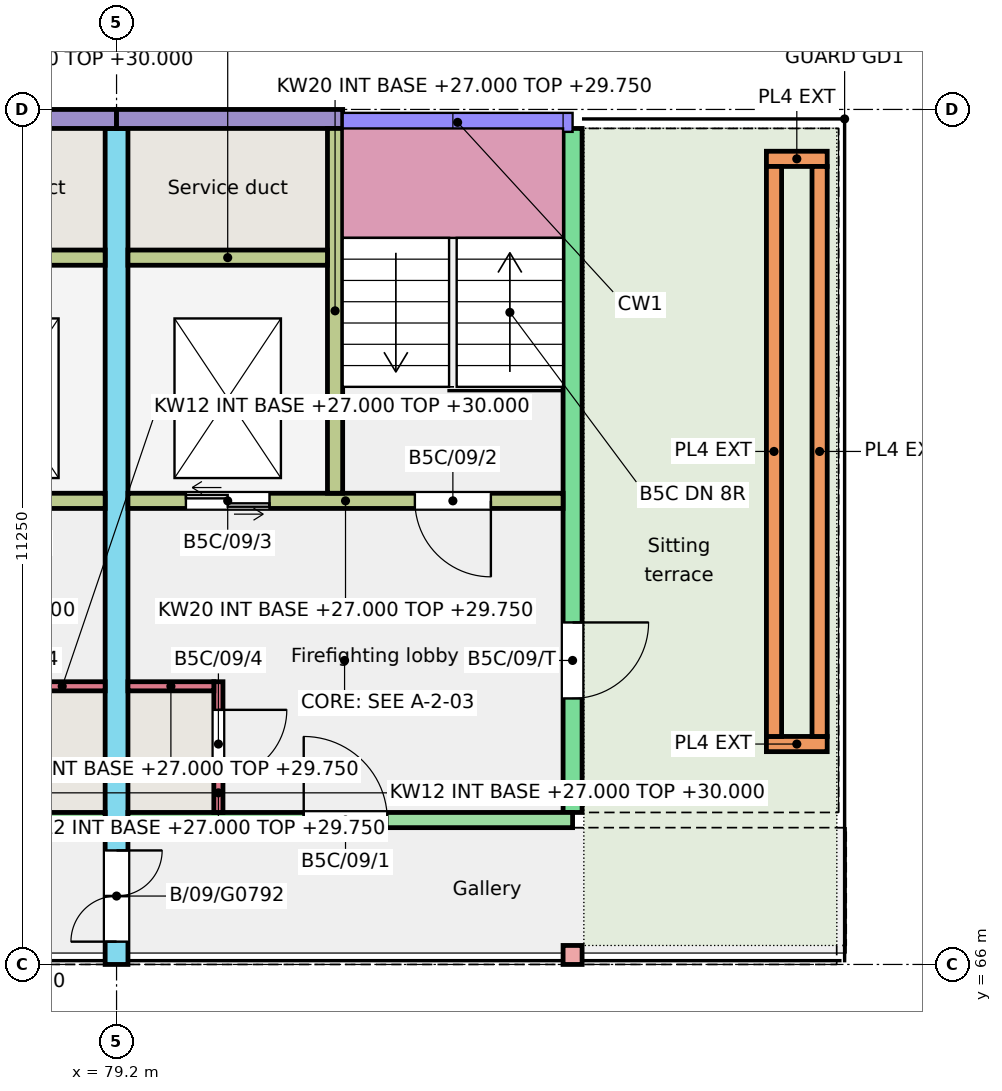
"""IFC4 building model, lengths in metres.
Left out: names, types, materials, properties, quantities, classifications, styles, units other than length and angle.
Written with IfcOpenShell. Run it as: python <this file> out.ifc"""

import sys

from ifc_helpers import new_model, si_unit, direction, frame, frame_2d, origin, origin_2d, place, context, subcontext, project, spatial, rectangle, extrude, element, fill, save


model = new_model("IFC4")
c1 = context("Model", 3, precision=1e-05, world=origin(), true_north=direction((0.0, 1.0)))
c2 = subcontext(c1, "Body", "Model", "MODEL_VIEW")
j1 = project(units=[si_unit("LENGTHUNIT", "METRE"), si_unit("PLANEANGLEUNIT", "RADIAN")], contexts=[c1])
p1 = place(None, origin())
s1 = spatial("IfcSite", under=j1, at=p1, CompositionType="ELEMENT")
p2 = place(p1, origin())
s2 = spatial("IfcBuilding", under=s1, at=p2, CompositionType="ELEMENT")
p3 = place(p2, frame((0.0, 0.0, 27.0)))
s3 = spatial("IfcBuildingStorey", under=s2, at=p3, CompositionType="ELEMENT", Elevation=27.0)
p4 = place(p3, frame((79.2, 66.0, 0.0), z_axis=(0.0, 0.0, 1.0), x_axis=(0.0, 1.0, 0.0)))
e1 = element("IfcWall", 1, at=p4, inside=s3, PredefinedType="SHEAR", context=c2, shape_type="SweptSolid", body=[
    extrude(rectangle(XDim=11.0, YDim=0.3, at=frame_2d((5.5, 0.0))), origin(), (0.0, 0.0, 1.0), 3.0),
])
p5 = place(p4, frame((0.3, 0.0, 0.0)))
e2 = element("IfcOpeningElement", 2, at=p5, cuts=e1, PredefinedType="OPENING", context=c2, shape_type="SweptSolid", body=[
    extrude(rectangle(XDim=1.2, YDim=2.1, at=frame_2d((0.6, 1.05))), frame((0.0, 0.16, 0.0), z_axis=(0.0, -1.0, 0.0), x_axis=(1.0, 0.0, 0.0)), (0.0, 0.0, 1.0), 0.32),
])
p6 = place(p3, frame((85.2, 68.0, 0.0), z_axis=(0.0, 0.0, 1.0), x_axis=(0.0, 1.0, 0.0)))
e3 = element("IfcWall", 3, at=p6, inside=s3, PredefinedType="SHEAR", context=c2, shape_type="SweptSolid", body=[
    extrude(rectangle(XDim=9.0, YDim=0.25, at=frame_2d((4.5, 0.0))), origin(), (0.0, 0.0, 1.0), 3.0),
])
p7 = place(p6, frame((1.5, 0.0, 0.0)))
e4 = element("IfcOpeningElement", 4, at=p7, cuts=e3, PredefinedType="OPENING", context=c2, shape_type="SweptSolid", body=[
    extrude(rectangle(XDim=1.0, YDim=2.1, at=frame_2d((0.5, 1.05))), frame((0.0, 0.135, 0.0), z_axis=(0.0, -1.0, 0.0), x_axis=(1.0, 0.0, 0.0)), (0.0, 0.0, 1.0), 0.27),
])
p8 = place(p3, frame((76.225, 77.125, 0.0), z_axis=(0.0, 0.0, 1.0), x_axis=(1.0, 0.0, 0.0)))
e5 = element("IfcWall", 5, at=p8, inside=s3, PredefinedType="SOLIDWALL", context=c2, shape_type="SweptSolid", body=[
    extrude(rectangle(XDim=2.975, YDim=0.25, at=frame_2d((1.487, 0.0))), origin(), (0.0, 0.0, 1.0), 3.0),
])
p9 = place(p3, frame((73.2, 67.9, 0.0), z_axis=(0.0, 0.0, 1.0), x_axis=(1.0, 0.0, 0.0)))
e6 = element("IfcWall", 6, at=p9, inside=s3, PredefinedType="SHEAR", context=c2, shape_type="SweptSolid", body=[
    extrude(rectangle(XDim=5.85, YDim=0.2, at=frame_2d((2.925, 0.0))), origin(), (0.0, 0.0, 1.0), 3.0),
])
p10 = place(p9, frame((2.438, 0.0, 0.0)))
e7 = element("IfcOpeningElement", 7, at=p10, cuts=e6, PredefinedType="OPENING", context=c2, shape_type="SweptSolid", body=[
    extrude(rectangle(XDim=1.1, YDim=2.1, at=frame_2d((0.55, 1.05))), frame((0.0, 0.11, 0.0), z_axis=(0.0, -1.0, 0.0), x_axis=(1.0, 0.0, 0.0)), (0.0, 0.0, 1.0), 0.22),
])
p11 = place(p3, frame((73.325, 72.1, 0.0), z_axis=(0.0, 0.0, 1.0), x_axis=(1.0, 0.0, 0.0)))
e8 = element("IfcWall", 8, at=p11, inside=s3, PredefinedType="SHEAR", context=c2, shape_type="SweptSolid", body=[
    extrude(rectangle(XDim=5.725, YDim=0.2, at=frame_2d((2.863, 0.0))), origin(), (0.0, 0.0, 1.0), 3.0),
])
p12 = place(p11, frame((0.95, 0.0, 0.0)))
e9 = element("IfcOpeningElement", 9, at=p12, cuts=e8, PredefinedType="OPENING", context=c2, shape_type="SweptSolid", body=[
    extrude(rectangle(XDim=1.0, YDim=2.1, at=frame_2d((0.5, 1.05))), frame((0.0, 0.11, 0.0), z_axis=(0.0, -1.0, 0.0), x_axis=(1.0, 0.0, 0.0)), (0.0, 0.0, 1.0), 0.22),
])
p13 = place(p11, frame((3.863, 0.0, 0.0)))
e10 = element("IfcOpeningElement", 10, at=p13, cuts=e8, PredefinedType="OPENING", context=c2, shape_type="SweptSolid", body=[
    extrude(rectangle(XDim=1.1, YDim=2.1, at=frame_2d((0.55, 1.05))), frame((0.0, 0.11, 0.0), z_axis=(0.0, -1.0, 0.0), x_axis=(1.0, 0.0, 0.0)), (0.0, 0.0, 1.0), 0.22),
])
p14 = place(p3, frame((76.425, 75.3, 0.0), z_axis=(0.0, 0.0, 1.0), x_axis=(1.0, 0.0, 0.0)))
e11 = element("IfcWall", 11, at=p14, inside=s3, PredefinedType="SHEAR", context=c2, shape_type="SweptSolid", body=[
    extrude(rectangle(XDim=2.625, YDim=0.2, at=frame_2d((1.312, 0.0))), origin(), (0.0, 0.0, 1.0), 3.0),
])
p15 = place(p3, frame((77.92, 69.66, 0.0), z_axis=(0.0, 0.0, 1.0), x_axis=(1.0, 0.0, 0.0)))
e12 = element("IfcWall", 12, at=p15, inside=s3, PredefinedType="SHEAR", context=c2, shape_type="SweptSolid", body=[
    extrude(rectangle(XDim=1.13, YDim=0.12, at=frame_2d((0.565, 0.0))), origin(), (0.0, 0.0, 1.0), 3.0),
])
p16 = place(p3, frame((79.2, 77.125, 0.0), z_axis=(0.0, 0.0, 1.0), x_axis=(1.0, 0.0, 0.0)))
e13 = element("IfcWall", 13, at=p16, inside=s3, PredefinedType="SOLIDWALL", context=c2, shape_type="SweptSolid", body=[
    extrude(rectangle(XDim=2.975, YDim=0.25, at=frame_2d((1.488, 0.0))), origin(), (0.0, 0.0, 1.0), 3.0),
])
p17 = place(p3, frame((79.35, 67.9, 0.0), z_axis=(0.0, 0.0, 1.0), x_axis=(1.0, 0.0, 0.0)))
e14 = element("IfcWall", 14, at=p17, inside=s3, PredefinedType="SHEAR", context=c2, shape_type="SweptSolid", body=[
    extrude(rectangle(XDim=5.85, YDim=0.2, at=frame_2d((2.925, 0.0))), origin(), (0.0, 0.0, 1.0), 2.75),
])
p18 = place(p17, frame((2.312, 0.0, 0.0)))
e15 = element("IfcOpeningElement", 15, at=p18, cuts=e14, PredefinedType="OPENING", context=c2, shape_type="SweptSolid", body=[
    extrude(rectangle(XDim=1.1, YDim=2.1, at=frame_2d((0.55, 1.05))), frame((0.0, 0.11, 0.0), z_axis=(0.0, -1.0, 0.0), x_axis=(1.0, 0.0, 0.0)), (0.0, 0.0, 1.0), 0.22),
])
p19 = place(p3, frame((79.35, 72.1, 0.0), z_axis=(0.0, 0.0, 1.0), x_axis=(1.0, 0.0, 0.0)))
e16 = element("IfcWall", 16, at=p19, inside=s3, PredefinedType="SHEAR", context=c2, shape_type="SweptSolid", body=[
    extrude(rectangle(XDim=5.725, YDim=0.2, at=frame_2d((2.862, 0.0))), origin(), (0.0, 0.0, 1.0), 2.75),
])
p20 = place(p19, frame((3.775, 0.0, 0.0)))
e17 = element("IfcOpeningElement", 17, at=p20, cuts=e16, PredefinedType="OPENING", context=c2, shape_type="SweptSolid", body=[
    extrude(rectangle(XDim=1.0, YDim=2.1, at=frame_2d((0.5, 1.05))), frame((0.0, 0.11, 0.0), z_axis=(0.0, -1.0, 0.0), x_axis=(1.0, 0.0, 0.0)), (0.0, 0.0, 1.0), 0.22),
])
p21 = place(p19, frame((0.762, 0.0, 0.0)))
e18 = element("IfcOpeningElement", 18, at=p21, cuts=e16, PredefinedType="OPENING", context=c2, shape_type="SweptSolid", body=[
    extrude(rectangle(XDim=1.1, YDim=2.1, at=frame_2d((0.55, 1.05))), frame((0.0, 0.11, 0.0), z_axis=(0.0, -1.0, 0.0), x_axis=(1.0, 0.0, 0.0)), (0.0, 0.0, 1.0), 0.22),
])
p22 = place(p3, frame((82.075, 72.2, 0.0), z_axis=(0.0, 0.0, 1.0), x_axis=(0.0, 1.0, 0.0)))
e19 = element("IfcWall", 19, at=p22, inside=s3, PredefinedType="SHEAR", context=c2, shape_type="SweptSolid", body=[
    extrude(rectangle(XDim=4.8, YDim=0.2, at=frame_2d((2.4, 0.0))), origin(), (0.0, 0.0, 1.0), 2.75),
])
p23 = place(p3, frame((79.35, 75.3, 0.0), z_axis=(0.0, 0.0, 1.0), x_axis=(1.0, 0.0, 0.0)))
e20 = element("IfcWall", 20, at=p23, inside=s3, PredefinedType="SHEAR", context=c2, shape_type="SweptSolid", body=[
    extrude(rectangle(XDim=2.625, YDim=0.2, at=frame_2d((1.312, 0.0))), origin(), (0.0, 0.0, 1.0), 2.75),
])
p24 = place(p3, frame((80.54, 68.0, 0.0), z_axis=(0.0, 0.0, 1.0), x_axis=(0.0, 1.0, 0.0)))
e21 = element("IfcWall", 21, at=p24, inside=s3, PredefinedType="SHEAR", context=c2, shape_type="SweptSolid", body=[
    extrude(rectangle(XDim=1.72, YDim=0.12, at=frame_2d((0.86, 0.0))), origin(), (0.0, 0.0, 1.0), 2.75),
])
p25 = place(p24, frame((0.45, 0.0, 0.0)))
e22 = element("IfcOpeningElement", 22, at=p25, cuts=e21, PredefinedType="OPENING", context=c2, shape_type="SweptSolid", body=[
    extrude(rectangle(XDim=0.9, YDim=2.1, at=frame_2d((0.45, 1.05))), frame((0.0, 0.07, 0.0), z_axis=(0.0, -1.0, 0.0), x_axis=(1.0, 0.0, 0.0)), (0.0, 0.0, 1.0), 0.14),
])
p26 = place(p3, frame((79.35, 69.66, 0.0), z_axis=(0.0, 0.0, 1.0), x_axis=(1.0, 0.0, 0.0)))
e23 = element("IfcWall", 23, at=p26, inside=s3, PredefinedType="SHEAR", context=c2, shape_type="SweptSolid", body=[
    extrude(rectangle(XDim=1.13, YDim=0.12, at=frame_2d((0.565, 0.0))), origin(), (0.0, 0.0, 1.0), 2.75),
])
p27 = place(p3, frame((85.2, 66.125, 0.0), z_axis=(0.0, 0.0, 1.0), x_axis=(1.0, 0.0, 0.0)))
e24 = element("IfcColumn", 24, at=p27, inside=s3, PredefinedType="COLUMN", context=c2, shape_type="SweptSolid", body=[
    extrude(rectangle(XDim=0.25, YDim=0.25, at=origin_2d()), origin(), (0.0, 0.0, 1.0), 3.0),
])
for number, where, z_axis, x_axis in (
    (25, (87.75, 68.9, 0.01), (0.0, 0.0, 1.0), (1.0, 0.0, 0.0)),
    (26, (87.75, 76.6, 0.01), (0.0, 0.0, 1.0), (1.0, 0.0, 0.0)),
):
    element("IfcWall", number, at=place(p3, frame(where, z_axis=z_axis, x_axis=x_axis)), inside=s3, PredefinedType="SOLIDWALL", context=c2, shape_type="SweptSolid", body=[
        extrude(rectangle(XDim=0.8, YDim=0.2, at=frame_2d((0.4, 0.0))), origin(), (0.0, 0.0, 1.0), 0.45),
    ])
for number, where, z_axis, x_axis in (
    (27, (87.85, 69.0, 0.01), (0.0, 0.0, 1.0), (0.0, 1.0, 0.0)),
    (28, (88.45, 69.0, 0.01), (0.0, 0.0, 1.0), (0.0, 1.0, 0.0)),
):
    element("IfcWall", number, at=place(p3, frame(where, z_axis=z_axis, x_axis=x_axis)), inside=s3, PredefinedType="SOLIDWALL", context=c2, shape_type="SweptSolid", body=[
        extrude(rectangle(XDim=7.5, YDim=0.2, at=frame_2d((3.75, 0.0))), origin(), (0.0, 0.0, 1.0), 0.45),
    ])
p28 = place(p18, origin())
e29 = element("IfcDoor", 29, at=p28, inside=s3, OperationType="SINGLE_SWING_LEFT", PredefinedType="DOOR", context=c2, shape_type="SweptSolid", body=[
    extrude(rectangle(XDim=1.1, YDim=2.1, at=frame_2d((0.55, 1.05))), frame((0.0, 0.025, 0.0), z_axis=(0.0, -1.0, 0.0), x_axis=(1.0, 0.0, 0.0)), (0.0, 0.0, 1.0), 0.05),
])
fill(e15, e29)
p29 = place(p20, origin())
e30 = element("IfcDoor", 30, at=p29, inside=s3, OperationType="SINGLE_SWING_RIGHT", PredefinedType="DOOR", context=c2, shape_type="SweptSolid", body=[
    extrude(rectangle(XDim=1.0, YDim=2.1, at=frame_2d((0.5, 1.05))), frame((0.0, 0.025, 0.0), z_axis=(0.0, -1.0, 0.0), x_axis=(1.0, 0.0, 0.0)), (0.0, 0.0, 1.0), 0.05),
])
fill(e17, e30)
p30 = place(p21, origin())
e31 = element("IfcDoor", 31, at=p30, inside=s3, OperationType="DOUBLE_DOOR_SLIDING", PredefinedType="DOOR", context=c2, shape_type="SweptSolid", body=[
    extrude(rectangle(XDim=1.1, YDim=2.1, at=frame_2d((0.55, 1.05))), frame((0.0, 0.025, 0.0), z_axis=(0.0, -1.0, 0.0), x_axis=(1.0, 0.0, 0.0)), (0.0, 0.0, 1.0), 0.05),
])
fill(e18, e31)
p31 = place(p25, origin())
e32 = element("IfcDoor", 32, at=p31, inside=s3, OperationType="SINGLE_SWING_RIGHT", PredefinedType="DOOR", context=c2, shape_type="SweptSolid", body=[
    extrude(rectangle(XDim=0.9, YDim=2.1, at=frame_2d((0.45, 1.05))), frame((0.0, 0.025, 0.0), z_axis=(0.0, -1.0, 0.0), x_axis=(1.0, 0.0, 0.0)), (0.0, 0.0, 1.0), 0.05),
])
fill(e22, e32)
p32 = place(p7, origin())
e33 = element("IfcDoor", 33, at=p32, inside=s3, OperationType="SINGLE_SWING_RIGHT", PredefinedType="DOOR", context=c2, shape_type="SweptSolid", body=[
    extrude(rectangle(XDim=1.0, YDim=2.1, at=frame_2d((0.5, 1.05))), frame((0.0, 0.025, 0.0), z_axis=(0.0, -1.0, 0.0), x_axis=(1.0, 0.0, 0.0)), (0.0, 0.0, 1.0), 0.05),
])
fill(e4, e33)
p33 = place(p5, origin())
e34 = element("IfcDoor", 34, at=p33, inside=s3, OperationType="DOUBLE_DOOR_SINGLE_SWING", PredefinedType="DOOR", context=c2, shape_type="SweptSolid", body=[
    extrude(rectangle(XDim=1.2, YDim=2.1, at=frame_2d((0.6, 1.05))), frame((0.0, 0.025, 0.0), z_axis=(0.0, -1.0, 0.0), x_axis=(1.0, 0.0, 0.0)), (0.0, 0.0, 1.0), 0.05),
])
fill(e2, e34)
save(model, sys.argv[1])
